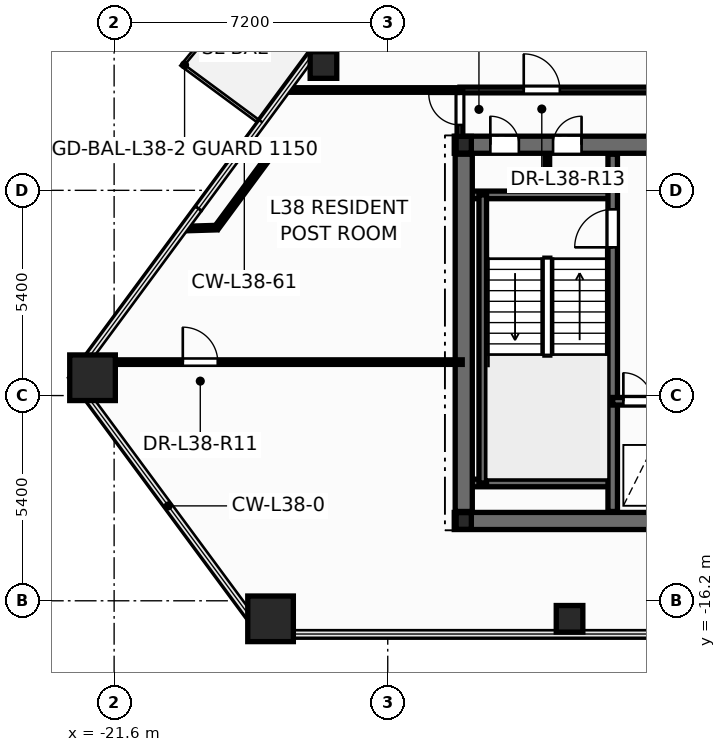
"""IFC4 building model, lengths in metres.
Left out: names, types, materials, properties, quantities, classifications, styles, units other than length and angle.
Written with IfcOpenShell. Run it as: python <this file> out.ifc"""

import sys

from ifc_helpers import new_model, si_unit, direction, frame, frame_2d, origin, origin_2d, place, context, subcontext, project, spatial, rectangle, hollow_rectangle, hollow_circle, i_section, extrude, element, fill, save


model = new_model("IFC4")
c1 = context("Model", 3, precision=1e-05, world=origin(), true_north=direction((0.0, 1.0)))
c2 = subcontext(c1, "Body", "Model", "MODEL_VIEW")
j1 = project(units=[si_unit("LENGTHUNIT", "METRE"), si_unit("PLANEANGLEUNIT", "RADIAN")], contexts=[c1])
p1 = place(None, origin())
s1 = spatial("IfcSite", under=j1, at=p1, CompositionType="ELEMENT")
p2 = place(p1, origin())
s2 = spatial("IfcBuilding", under=s1, at=p2, CompositionType="ELEMENT")
p3 = place(p2, frame((0.0, 0.0, 147.3)))
s3 = spatial("IfcBuildingStorey", under=s2, at=p3, CompositionType="ELEMENT", Elevation=147.3)
for number, where, z_axis, x_axis in (
    (1, (-22.168, -10.331, 0.0), (0.0, 0.0, 1.0), (1.0, 0.0, 0.0)),
    (2, (-17.484, -16.674, 0.0), (0.0, 0.0, 1.0), (1.0, 0.0, 0.0)),
):
    element("IfcColumn", number, at=place(p3, frame(where, z_axis=z_axis, x_axis=x_axis)), inside=s3, PredefinedType="COLUMN", context=c2, shape_type="SweptSolid", body=[
        extrude(hollow_rectangle(XDim=1.2, YDim=1.2, WallThickness=0.055, at=origin_2d()), origin(), (0.0, 0.0, 1.0), 3.6),
    ])
for number, where, z_axis, x_axis in (
    (3, (-9.616, -16.674, 0.0), (0.0, 0.0, 1.0), (1.0, 0.0, 0.0)),
    (4, (-16.092, -2.103, 0.0), (0.0, 0.0, 1.0), (1.0, 0.0, 0.0)),
):
    element("IfcColumn", number, at=place(p3, frame(where, z_axis=z_axis, x_axis=x_axis)), inside=s3, PredefinedType="COLUMN", context=c2, shape_type="SweptSolid", body=[
        extrude(hollow_circle(Radius=0.35, WallThickness=0.03, at=origin_2d()), origin(), (0.0, 0.0, 1.0), 3.6),
    ])
for number, where, z_axis, x_axis in (
    (5, (-12.4, -14.1, 0.0), (0.0, 0.0, 1.0), (1.0, 0.0, 0.0)),
    (6, (-12.4, -4.2, 0.0), (0.0, 0.0, 1.0), (1.0, 0.0, 0.0)),
):
    element("IfcColumn", number, at=place(p3, frame(where, z_axis=z_axis, x_axis=x_axis)), inside=s3, PredefinedType="COLUMN", context=c2, shape_type="SweptSolid", body=[
        extrude(i_section(OverallWidth=0.4, OverallDepth=0.44, WebThickness=0.028, FlangeThickness=0.04, at=origin_2d()), origin(), (0.0, 0.0, 1.0), 3.6),
    ])
p4 = place(p3, frame((-10.2, -5.52, 0.0), z_axis=(0.0, 0.0, 1.0), x_axis=(0.0, 1.0, 0.0)))
e7 = element("IfcWall", 7, at=p4, inside=s3, PredefinedType="PARTITIONING", context=c2, shape_type="SweptSolid", body=[
    extrude(rectangle(XDim=1.12, YDim=0.12, at=frame_2d((0.56, 0.0))), origin(), (0.0, 0.0, 1.0), 3.35),
])
p5 = place(p3, frame((-12.65, -14.1, 0.0), z_axis=(0.0, 0.0, 1.0), x_axis=(1.0, 0.0, 0.0)))
e8 = element("IfcWall", 8, at=p5, inside=s3, PredefinedType="SHEAR", context=c2, shape_type="SweptSolid", body=[
    extrude(rectangle(XDim=25.3, YDim=0.45, at=frame_2d((12.65, 0.0))), origin(), (0.0, 0.0, 1.0), 3.6),
])
p6 = place(p3, frame((-12.65, -4.2, 0.0), z_axis=(0.0, 0.0, 1.0), x_axis=(1.0, 0.0, 0.0)))
e9 = element("IfcWall", 9, at=p6, inside=s3, PredefinedType="SHEAR", context=c2, shape_type="SweptSolid", body=[
    extrude(rectangle(XDim=25.3, YDim=0.45, at=frame_2d((12.65, 0.0))), origin(), (0.0, 0.0, 1.0), 3.6),
])
p7 = place(p6, frame((0.95, 0.0, 0.0)))
e10 = element("IfcOpeningElement", 10, at=p7, cuts=e9, PredefinedType="OPENING", context=c2, shape_type="SweptSolid", body=[
    extrude(rectangle(XDim=0.756, YDim=2.054, at=frame_2d((0.375, 1.027))), frame((0.0, 0.235, 0.0), z_axis=(0.0, -1.0, 0.0), x_axis=(1.0, 0.0, 0.0)), (0.0, 0.0, 1.0), 0.47),
])
p8 = place(p6, frame((2.6, 0.0, 0.0)))
e11 = element("IfcOpeningElement", 11, at=p8, cuts=e9, PredefinedType="OPENING", context=c2, shape_type="SweptSolid", body=[
    extrude(rectangle(XDim=0.756, YDim=2.054, at=frame_2d((0.375, 1.027))), frame((0.0, 0.235, 0.0), z_axis=(0.0, -1.0, 0.0), x_axis=(1.0, 0.0, 0.0)), (0.0, 0.0, 1.0), 0.47),
])
p9 = place(p6, frame((21.85, 0.0, 0.0)))
e12 = element("IfcOpeningElement", 12, at=p9, cuts=e9, PredefinedType="OPENING", context=c2, shape_type="SweptSolid", body=[
    extrude(rectangle(XDim=0.756, YDim=2.054, at=frame_2d((0.375, 1.027))), frame((0.0, 0.235, 0.0), z_axis=(0.0, -1.0, 0.0), x_axis=(1.0, 0.0, 0.0)), (0.0, 0.0, 1.0), 0.47),
])
p10 = place(p6, frame((23.5, 0.0, 0.0)))
e13 = element("IfcOpeningElement", 13, at=p10, cuts=e9, PredefinedType="OPENING", context=c2, shape_type="SweptSolid", body=[
    extrude(rectangle(XDim=0.756, YDim=2.054, at=frame_2d((0.375, 1.027))), frame((0.0, 0.235, 0.0), z_axis=(0.0, -1.0, 0.0), x_axis=(1.0, 0.0, 0.0)), (0.0, 0.0, 1.0), 0.47),
])
p11 = place(p6, frame((5.85, 0.0, 0.0)))
e14 = element("IfcOpeningElement", 14, at=p11, cuts=e9, PredefinedType="OPENING", context=c2, shape_type="SweptSolid", body=[
    extrude(rectangle(XDim=1.006, YDim=2.104, at=frame_2d((0.5, 1.052))), frame((0.0, 0.235, 0.0), z_axis=(0.0, -1.0, 0.0), x_axis=(1.0, 0.0, 0.0)), (0.0, 0.0, 1.0), 0.47),
])
p12 = place(p6, frame((10.35, 0.0, 0.0)))
e15 = element("IfcOpeningElement", 15, at=p12, cuts=e9, PredefinedType="OPENING", context=c2, shape_type="SweptSolid", body=[
    extrude(rectangle(XDim=1.406, YDim=2.154, at=frame_2d((0.7, 1.077))), frame((0.0, 0.235, 0.0), z_axis=(0.0, -1.0, 0.0), x_axis=(1.0, 0.0, 0.0)), (0.0, 0.0, 1.0), 0.47),
])
p13 = place(p6, frame((18.45, 0.0, 0.0)))
e16 = element("IfcOpeningElement", 16, at=p13, cuts=e9, PredefinedType="OPENING", context=c2, shape_type="SweptSolid", body=[
    extrude(rectangle(XDim=1.006, YDim=2.104, at=frame_2d((0.5, 1.052))), frame((0.0, 0.235, 0.0), z_axis=(0.0, -1.0, 0.0), x_axis=(1.0, 0.0, 0.0)), (0.0, 0.0, 1.0), 0.47),
])
for number, where, z_axis, x_axis in (
    (17, (-12.35, -5.52, 0.0), (0.0, 0.0, 1.0), (1.0, 0.0, 0.0)),
    (18, (-12.35, -13.1, 0.0), (0.0, 0.0, 1.0), (1.0, 0.0, 0.0)),
):
    element("IfcWall", number, at=place(p3, frame(where, z_axis=z_axis, x_axis=x_axis)), inside=s3, PredefinedType="SOLIDWALL", context=c2, shape_type="SweptSolid", body=[
        extrude(rectangle(XDim=3.87, YDim=0.2, at=frame_2d((1.935, 0.0))), origin(), (0.0, 0.0, 1.0), 3.6),
    ])
p14 = place(p3, frame((-11.9, -13.1, 0.0), z_axis=(0.0, 0.0, 1.0), x_axis=(0.0, 1.0, 0.0)))
e19 = element("IfcWall", 19, at=p14, inside=s3, PredefinedType="SOLIDWALL", context=c2, shape_type="SweptSolid", body=[
    extrude(rectangle(XDim=7.58, YDim=0.2, at=frame_2d((3.79, 0.0))), origin(), (0.0, 0.0, 1.0), 3.6),
])
p15 = place(p3, frame((-8.48, -13.85, 0.0), z_axis=(0.0, 0.0, 1.0), x_axis=(0.0, 1.0, 0.0)))
e20 = element("IfcWall", 20, at=p15, inside=s3, PredefinedType="SHEAR", context=c2, shape_type="SweptSolid", body=[
    extrude(rectangle(XDim=9.4, YDim=0.25, at=frame_2d((4.7, 0.0))), origin(), (0.0, 0.0, 1.0), 3.6),
])
p16 = place(p15, frame((6.95, 0.0, 0.0)))
e21 = element("IfcOpeningElement", 21, at=p16, cuts=e20, PredefinedType="OPENING", context=c2, shape_type="SweptSolid", body=[
    extrude(rectangle(XDim=1.006, YDim=2.104, at=frame_2d((0.5, 1.052))), frame((0.0, 0.135, 0.0), z_axis=(0.0, -1.0, 0.0), x_axis=(1.0, 0.0, 0.0)), (0.0, 0.0, 1.0), 0.27),
])
p17 = place(p3, frame((-8.48, -10.95, 0.0), z_axis=(0.0, 0.0, 1.0), x_axis=(1.0, 0.0, 0.0)))
e22 = element("IfcWall", 22, at=p17, inside=s3, PredefinedType="SOLIDWALL", context=c2, shape_type="SweptSolid", body=[
    extrude(rectangle(XDim=3.36, YDim=0.2, at=frame_2d((1.68, 0.0))), origin(), (0.0, 0.0, 1.0), 3.6),
])
p18 = place(p17, frame((0.28, 0.0, 0.0)))
e23 = element("IfcOpeningElement", 23, at=p18, cuts=e22, PredefinedType="OPENING", context=c2, shape_type="SweptSolid", body=[
    extrude(rectangle(XDim=0.756, YDim=2.054, at=frame_2d((0.375, 1.027))), frame((0.0, 0.11, 0.0), z_axis=(0.0, -1.0, 0.0), x_axis=(1.0, 0.0, 0.0)), (0.0, 0.0, 1.0), 0.22),
])
p19 = place(p17, frame((1.85, 0.0, 0.0)))
e24 = element("IfcOpeningElement", 24, at=p19, cuts=e22, PredefinedType="OPENING", context=c2, shape_type="SweptSolid", body=[
    extrude(rectangle(XDim=1.106, YDim=2.104, at=frame_2d((0.55, 1.052))), frame((0.0, 0.11, 0.0), z_axis=(0.0, -1.0, 0.0), x_axis=(1.0, 0.0, 0.0)), (0.0, 0.0, 1.0), 0.22),
])
p20 = place(p3, frame((-12.4, -13.85, 0.0), z_axis=(0.0, 0.0, 1.0), x_axis=(0.0, 1.0, 0.0)))
e25 = element("IfcWall", 25, at=p20, inside=s3, PredefinedType="SHEAR", context=c2, shape_type="SweptSolid", body=[
    extrude(rectangle(XDim=9.4, YDim=0.45, at=frame_2d((4.7, 0.0))), origin(), (0.0, 0.0, 1.0), 3.6),
])
p21 = place(p3, frame((-12.5, -2.76, 0.0), z_axis=(0.0, 0.0, 1.0), x_axis=(1.0, 0.0, 0.0)))
e26 = element("IfcWall", 26, at=p21, inside=s3, PredefinedType="PARTITIONING", context=c2, shape_type="SweptSolid", body=[
    extrude(rectangle(XDim=13.14, YDim=0.15, at=frame_2d((6.57, 0.0))), origin(), (0.0, 0.0, 1.0), 2.325),
])
p22 = place(p21, frame((1.679, 0.0, 0.0)))
e27 = element("IfcOpeningElement", 27, at=p22, cuts=e26, PredefinedType="OPENING", context=c2, shape_type="SweptSolid", body=[
    extrude(rectangle(XDim=0.956, YDim=2.104, at=frame_2d((0.475, 1.052))), frame((0.0, 0.085, 0.0), z_axis=(0.0, -1.0, 0.0), x_axis=(1.0, 0.0, 0.0)), (0.0, 0.0, 1.0), 0.17),
])
p23 = place(p3, frame((-22.362, -9.92, 0.0), z_axis=(0.0, 0.0, 1.0), x_axis=(1.0, 0.0, 0.0)))
e28 = element("IfcWall", 28, at=p23, inside=s3, PredefinedType="PARTITIONING", context=c2, shape_type="SweptSolid", body=[
    extrude(rectangle(XDim=9.922, YDim=0.12, at=frame_2d((4.961, 0.0))), origin(), (0.0, 0.0, 1.0), 2.325),
])
p24 = place(p23, frame((2.569, 0.0, 0.0)))
e29 = element("IfcOpeningElement", 29, at=p24, cuts=e28, PredefinedType="OPENING", context=c2, shape_type="SweptSolid", body=[
    extrude(rectangle(XDim=0.926, YDim=2.104, at=frame_2d((0.46, 1.052))), frame((0.0, 0.07, 0.0), z_axis=(0.0, -1.0, 0.0), x_axis=(1.0, 0.0, 0.0)), (0.0, 0.0, 1.0), 0.14),
])
p25 = place(p3, frame((-17.074, -2.76, 0.0), z_axis=(0.0, 0.0, 1.0), x_axis=(1.0, 0.0, 0.0)))
e30 = element("IfcWall", 30, at=p25, inside=s3, PredefinedType="PARTITIONING", context=c2, shape_type="SweptSolid", body=[
    extrude(rectangle(XDim=4.574, YDim=0.12, at=frame_2d((2.287, 0.0))), origin(), (0.0, 0.0, 1.0), 2.792),
])
p26 = place(p3, frame((-17.49, -4.468, 0.0), z_axis=(0.0, 0.0, 1.0), x_axis=(-0.594053249338, -0.804425718728, 0.0)))
e31 = element("IfcWall", 31, at=p26, inside=s3, PredefinedType="PARTITIONING", context=c2, shape_type="SweptSolid", body=[
    extrude(rectangle(XDim=2.378, YDim=0.12, at=frame_2d((1.189, 0.0))), origin(), (0.0, 0.0, 1.0), 3.35),
])
p27 = place(p3, frame((-12.5, -4.24, 0.0), z_axis=(0.0, 0.0, 1.0), x_axis=(0.0, 1.0, 0.0)))
e32 = element("IfcWall", 32, at=p27, inside=s3, PredefinedType="PARTITIONING", context=c2, shape_type="SweptSolid", body=[
    extrude(rectangle(XDim=1.48, YDim=0.15, at=frame_2d((0.74, 0.0))), origin(), (0.0, 0.0, 1.0), 2.325),
])
p28 = place(p27, frame((0.56, 0.0, 0.0)))
e33 = element("IfcOpeningElement", 33, at=p28, cuts=e32, PredefinedType="OPENING", context=c2, shape_type="SweptSolid", body=[
    extrude(rectangle(XDim=0.826, YDim=2.104, at=frame_2d((0.41, 1.052))), frame((0.0, 0.085, 0.0), z_axis=(0.0, -1.0, 0.0), x_axis=(1.0, 0.0, 0.0)), (0.0, 0.0, 1.0), 0.17),
])
p29 = place(p3, frame((-18.903, -6.381, 0.0), z_axis=(0.0, 0.0, 1.0), x_axis=(-0.999556038353, -0.029794734305, 0.0)))
e34 = element("IfcWall", 34, at=p29, inside=s3, PredefinedType="PARTITIONING", context=c2, shape_type="SweptSolid", body=[
    extrude(rectangle(XDim=0.852, YDim=0.12, at=frame_2d((0.426, 0.0))), origin(), (0.0, 0.0, 1.0), 2.792),
])
p30 = place(p3, frame((-18.029, -4.07, 0.0), z_axis=(0.0, 0.0, 1.0), x_axis=(0.80452433553, -0.593919686102, 0.0)))
e35 = element("IfcWall", 35, at=p30, inside=s3, PredefinedType="PARTITIONING", context=c2, shape_type="SweptSolid", body=[
    extrude(rectangle(XDim=0.67, YDim=0.12, at=frame_2d((0.335, 0.0))), origin(), (0.0, 0.0, 1.0), 2.792),
])
p31 = place(p16, origin())
e36 = element("IfcDoor", 36, at=p31, inside=s3, OperationType="SINGLE_SWING_LEFT", PredefinedType="DOOR", context=c2, shape_type="SweptSolid", body=[
    extrude(rectangle(XDim=1.0, YDim=2.1, at=frame_2d((0.5, 1.05))), frame((0.0, 0.025, 0.0), z_axis=(0.0, -1.0, 0.0), x_axis=(1.0, 0.0, 0.0)), (0.0, 0.0, 1.0), 0.05),
])
fill(e21, e36)
p32 = place(p18, origin())
e37 = element("IfcDoor", 37, at=p32, inside=s3, OperationType="SINGLE_SWING_LEFT", PredefinedType="DOOR", context=c2, shape_type="SweptSolid", body=[
    extrude(rectangle(XDim=0.75, YDim=2.05, at=frame_2d((0.375, 1.025))), frame((0.0, 0.025, 0.0), z_axis=(0.0, -1.0, 0.0), x_axis=(1.0, 0.0, 0.0)), (0.0, 0.0, 1.0), 0.05),
])
fill(e23, e37)
p33 = place(p7, origin())
e38 = element("IfcDoor", 38, at=p33, inside=s3, OperationType="SINGLE_SWING_LEFT", PredefinedType="DOOR", context=c2, shape_type="SweptSolid", body=[
    extrude(rectangle(XDim=0.75, YDim=2.05, at=frame_2d((0.375, 1.025))), frame((0.0, 0.025, 0.0), z_axis=(0.0, -1.0, 0.0), x_axis=(1.0, 0.0, 0.0)), (0.0, 0.0, 1.0), 0.05),
])
fill(e10, e38)
p34 = place(p8, origin())
e39 = element("IfcDoor", 39, at=p34, inside=s3, OperationType="SINGLE_SWING_RIGHT", PredefinedType="DOOR", context=c2, shape_type="SweptSolid", body=[
    extrude(rectangle(XDim=0.75, YDim=2.05, at=frame_2d((0.375, 1.025))), frame((0.0, 0.025, 0.0), z_axis=(0.0, -1.0, 0.0), x_axis=(1.0, 0.0, 0.0)), (0.0, 0.0, 1.0), 0.05),
])
fill(e11, e39)
p35 = place(p24, origin())
e40 = element("IfcDoor", 40, at=p35, inside=s3, OperationType="SINGLE_SWING_LEFT", PredefinedType="DOOR", context=c2, shape_type="SweptSolid", body=[
    extrude(rectangle(XDim=0.92, YDim=2.1, at=frame_2d((0.46, 1.05))), frame((0.0, 0.025, 0.0), z_axis=(0.0, -1.0, 0.0), x_axis=(1.0, 0.0, 0.0)), (0.0, 0.0, 1.0), 0.05),
])
fill(e29, e40)
p36 = place(p28, origin())
e41 = element("IfcDoor", 41, at=p36, inside=s3, OperationType="SINGLE_SWING_RIGHT", PredefinedType="DOOR", context=c2, shape_type="SweptSolid", body=[
    extrude(rectangle(XDim=0.82, YDim=2.1, at=frame_2d((0.41, 1.05))), frame((0.0, 0.025, 0.0), z_axis=(0.0, -1.0, 0.0), x_axis=(1.0, 0.0, 0.0)), (0.0, 0.0, 1.0), 0.05),
])
fill(e33, e41)
p37 = place(p22, origin())
e42 = element("IfcDoor", 42, at=p37, inside=s3, OperationType="SINGLE_SWING_LEFT", PredefinedType="DOOR", context=c2, shape_type="SweptSolid", body=[
    extrude(rectangle(XDim=0.95, YDim=2.1, at=frame_2d((0.475, 1.05))), frame((0.0, 0.025, 0.0), z_axis=(0.0, -1.0, 0.0), x_axis=(1.0, 0.0, 0.0)), (0.0, 0.0, 1.0), 0.05),
])
fill(e27, e42)
save(model, sys.argv[1])
